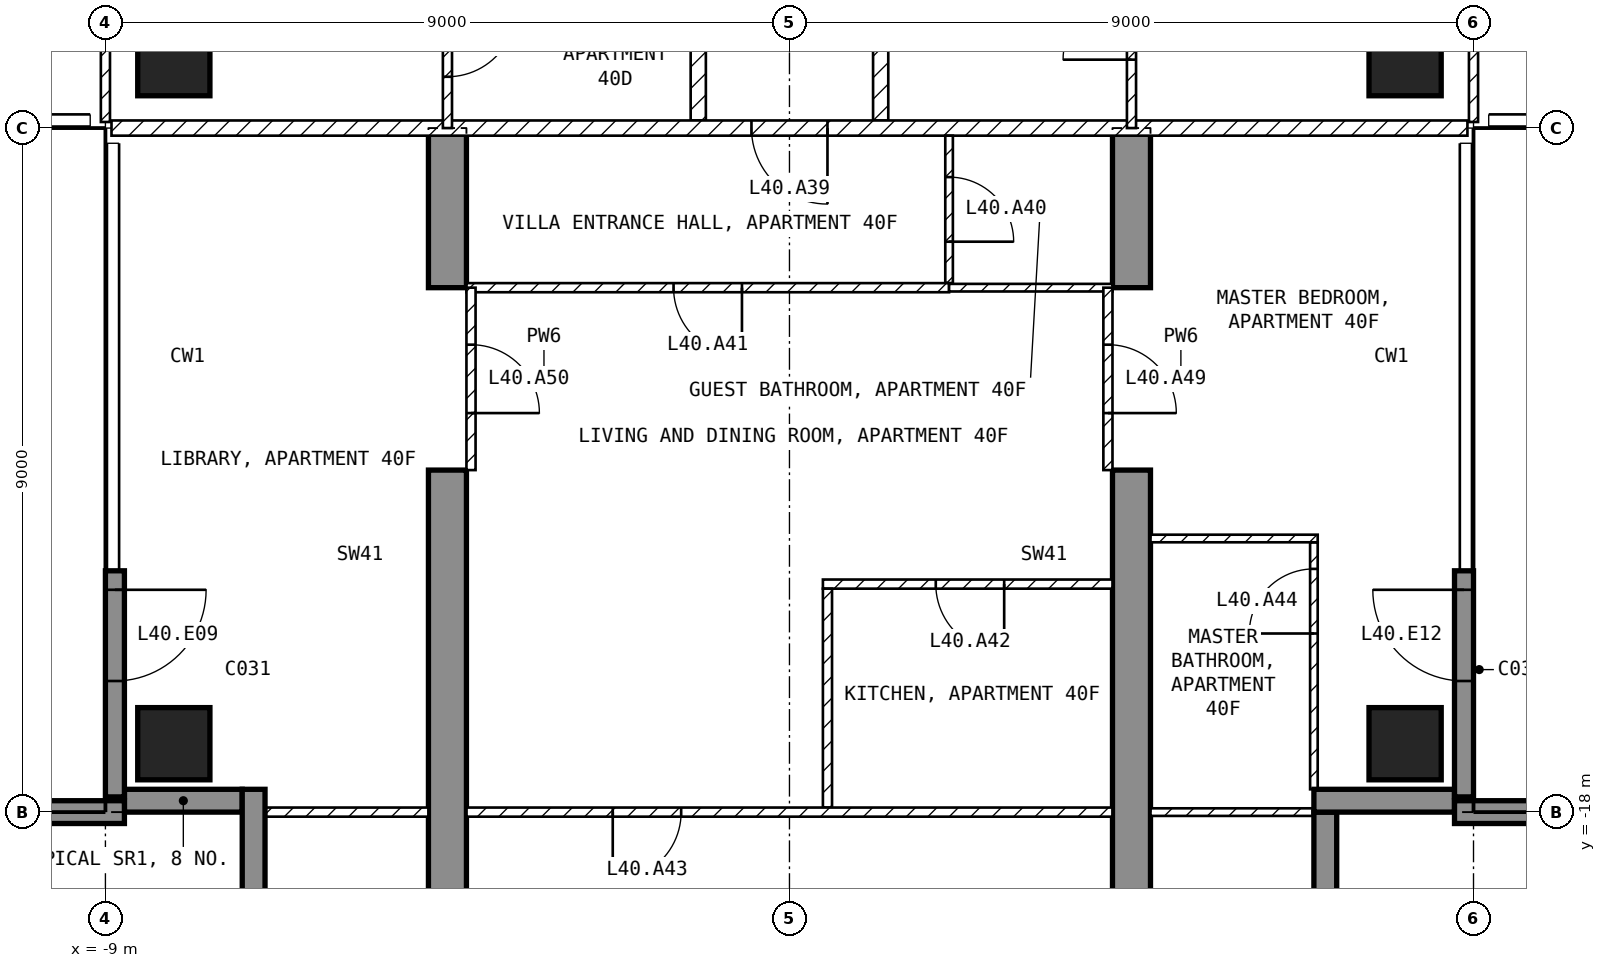
"""IFC4 building model, lengths in metres.
Left out: names, types, materials, properties, quantities, classifications, styles, units other than length and angle.
Written with IfcOpenShell. Run it as: python <this file> out.ifc"""

import sys

from ifc_helpers import new_model, si_unit, direction, frame, frame_2d, origin, origin_2d, place, context, subcontext, project, spatial, polyline, rectangle, outline, extrude, element, fill, save


model = new_model("IFC4")
c1 = context("Model", 3, precision=1e-05, world=origin(), true_north=direction((0.0, 1.0)))
c2 = subcontext(c1, "Body", "Model", "MODEL_VIEW")
j1 = project(units=[si_unit("LENGTHUNIT", "METRE"), si_unit("PLANEANGLEUNIT", "RADIAN")], contexts=[c1])
p1 = place(None, origin())
s1 = spatial("IfcSite", under=j1, at=p1, CompositionType="ELEMENT")
p2 = place(p1, origin())
s2 = spatial("IfcBuilding", under=s1, at=p2, CompositionType="ELEMENT")
p3 = place(p2, frame((0.0, 0.0, 166.6)))
s3 = spatial("IfcBuildingStorey", under=s2, at=p3, CompositionType="ELEMENT", Elevation=166.6)
for number, where, z_axis, x_axis in (
    (1, (-8.1, -17.1, -0.25), (0.0, 0.0, 1.0), (1.0, 0.0, 0.0)),
    (2, (-8.1, -8.1, -0.25), (0.0, 0.0, 1.0), (1.0, 0.0, 0.0)),
    (3, (8.1, -17.1, -0.25), (0.0, 0.0, 1.0), (1.0, 0.0, 0.0)),
    (4, (8.1, -8.1, -0.25), (0.0, 0.0, 1.0), (1.0, 0.0, 0.0)),
):
    element("IfcColumn", number, at=place(p3, frame(where, z_axis=z_axis, x_axis=x_axis)), inside=s3, PredefinedType="COLUMN", context=c2, shape_type="SweptSolid", body=[
        extrude(rectangle(XDim=0.95, YDim=0.95, at=origin_2d()), origin(), (0.0, 0.0, 1.0), 3.5),
    ])
for number, where, z_axis, x_axis in (
    (5, (-4.75, -20.225, -0.25), (1.0, 0.0, 0.0), (0.0, 1.0, 0.0)),
    (6, (4.25, -20.225, -0.25), (1.0, 0.0, 0.0), (0.0, 1.0, 0.0)),
):
    element("IfcWall", number, at=place(p3, frame(where, z_axis=z_axis, x_axis=x_axis)), inside=s3, PredefinedType="SHEAR", context=c2, shape_type="SweptSolid", body=[
        extrude(outline(polyline([(0.0, 0.0), (6.725, 0.0), (6.725, 2.65), (9.125, 2.65), (9.125, 0.0), (11.225, 0.0), (11.225, 3.5), (0.0, 3.5), (0.0, 0.0)])), origin(), (0.0, 0.0, 1.0), 0.5),
    ])
p4 = place(p3, frame((-8.875, -14.825, 0.0), z_axis=(0.0, 0.0, 1.0), x_axis=(0.0, -1.0, 0.0)))
e7 = element("IfcWall", 7, at=p4, inside=s3, PredefinedType="SOLIDWALL", context=c2, shape_type="SweptSolid", body=[
    extrude(rectangle(XDim=2.975, YDim=0.25, at=frame_2d((1.488, 0.0))), origin(), (0.0, 0.0, 1.0), 3.25),
])
p5 = place(p4, frame((0.25, 0.0, 0.0)))
e8 = element("IfcOpeningElement", 8, at=p5, cuts=e7, PredefinedType="OPENING", context=c2, shape_type="SweptSolid", body=[
    extrude(rectangle(XDim=1.2, YDim=2.4, at=frame_2d((0.6, 1.2))), frame((0.0, 0.135, 0.0), z_axis=(0.0, -1.0, 0.0), x_axis=(1.0, 0.0, 0.0)), (0.0, 0.0, 1.0), 0.27),
])
p6 = place(p3, frame((8.875, -17.8, 0.0), z_axis=(0.0, 0.0, 1.0), x_axis=(0.0, 1.0, 0.0)))
e9 = element("IfcWall", 9, at=p6, inside=s3, PredefinedType="SOLIDWALL", context=c2, shape_type="SweptSolid", body=[
    extrude(rectangle(XDim=2.975, YDim=0.25, at=frame_2d((1.488, 0.0))), origin(), (0.0, 0.0, 1.0), 3.25),
])
p7 = place(p6, frame((1.525, 0.0, 0.0)))
e10 = element("IfcOpeningElement", 10, at=p7, cuts=e9, PredefinedType="OPENING", context=c2, shape_type="SweptSolid", body=[
    extrude(rectangle(XDim=1.2, YDim=2.4, at=frame_2d((0.6, 1.2))), frame((0.0, 0.135, 0.0), z_axis=(0.0, -1.0, 0.0), x_axis=(1.0, 0.0, 0.0)), (0.0, 0.0, 1.0), 0.27),
])
p8 = place(p3, frame((7.05, -19.8, 0.0), z_axis=(0.0, 0.0, 1.0), x_axis=(0.0, 1.0, 0.0)))
e11 = element("IfcWall", 11, at=p8, inside=s3, PredefinedType="SOLIDWALL", context=c2, shape_type="SweptSolid", body=[
    extrude(rectangle(XDim=1.8, YDim=0.3, at=frame_2d((0.9, 0.0))), origin(), (0.0, 0.0, 1.0), 3.25),
])
p9 = place(p3, frame((6.9, -17.85, 0.0), z_axis=(0.0, 0.0, 1.0), x_axis=(1.0, 0.0, 0.0)))
e12 = element("IfcWall", 12, at=p9, inside=s3, PredefinedType="SOLIDWALL", context=c2, shape_type="SweptSolid", body=[
    extrude(rectangle(XDim=1.85, YDim=0.3, at=frame_2d((0.925, 0.0))), origin(), (0.0, 0.0, 1.0), 3.25),
])
p10 = place(p3, frame((-8.75, -17.85, 0.0), z_axis=(0.0, 0.0, 1.0), x_axis=(1.0, 0.0, 0.0)))
e13 = element("IfcWall", 13, at=p10, inside=s3, PredefinedType="SOLIDWALL", context=c2, shape_type="SweptSolid", body=[
    extrude(rectangle(XDim=1.55, YDim=0.3, at=frame_2d((0.775, 0.0))), origin(), (0.0, 0.0, 1.0), 3.25),
])
p11 = place(p3, frame((-7.05, -17.7, 0.0), z_axis=(0.0, 0.0, 1.0), x_axis=(0.0, -1.0, 0.0)))
e14 = element("IfcWall", 14, at=p11, inside=s3, PredefinedType="SOLIDWALL", context=c2, shape_type="SweptSolid", body=[
    extrude(rectangle(XDim=1.8, YDim=0.3, at=frame_2d((0.9, 0.0))), origin(), (0.0, 0.0, 1.0), 3.25),
])
for number, where, z_axis, x_axis in (
    (15, (-8.75, -18.0, 0.0), (0.0, 0.0, 1.0), (-1.0, 0.0, 0.0)),
    (16, (8.75, -18.0, 0.0), (0.0, 0.0, 1.0), (1.0, 0.0, 0.0)),
):
    element("IfcWall", number, at=place(p3, frame(where, z_axis=z_axis, x_axis=x_axis)), inside=s3, PredefinedType="SOLIDWALL", context=c2, shape_type="SweptSolid", body=[
        extrude(rectangle(XDim=2.95, YDim=0.3, at=frame_2d((1.475, 0.0))), origin(), (0.0, 0.0, 1.0), 3.25),
    ])
for number, where, z_axis, x_axis in (
    (17, (1.2, -4.6, 0.0), (0.0, 0.0, 1.0), (0.0, -1.0, 0.0)),
    (18, (-1.2, -8.9, 0.0), (0.0, 0.0, 1.0), (0.0, 1.0, 0.0)),
):
    element("IfcWall", number, at=place(p3, frame(where, z_axis=z_axis, x_axis=x_axis)), inside=s3, PredefinedType="PARTITIONING", context=c2, shape_type="SweptSolid", body=[
        extrude(rectangle(XDim=4.3, YDim=0.2, at=frame_2d((2.15, 0.0))), origin(), (0.0, 0.0, 1.0), 3.25),
    ])
p12 = place(p3, frame((8.92, -9.0, 0.0), z_axis=(0.0, 0.0, 1.0), x_axis=(-1.0, 0.0, 0.0)))
e19 = element("IfcWall", 19, at=p12, inside=s3, PredefinedType="PARTITIONING", context=c2, shape_type="SweptSolid", body=[
    extrude(rectangle(XDim=17.84, YDim=0.2, at=frame_2d((8.92, 0.0))), origin(), (0.0, 0.0, 1.0), 3.25),
])
p13 = place(p12, frame((8.42, 0.0, 0.0)))
e20 = element("IfcOpeningElement", 20, at=p13, cuts=e19, PredefinedType="OPENING", context=c2, shape_type="SweptSolid", body=[
    extrude(rectangle(XDim=1.0, YDim=2.1, at=frame_2d((0.5, 1.05))), frame((0.0, 0.11, 0.0), z_axis=(0.0, -1.0, 0.0), x_axis=(1.0, 0.0, 0.0)), (0.0, 0.0, 1.0), 0.22),
])
p14 = place(p3, frame((9.0, -8.92, 0.0), z_axis=(0.0, 0.0, 1.0), x_axis=(0.0, 1.0, 0.0)))
e21 = element("IfcWall", 21, at=p14, inside=s3, PredefinedType="PARTITIONING", context=c2, shape_type="SweptSolid", body=[
    extrude(rectangle(XDim=7.62, YDim=0.12, at=frame_2d((3.81, 0.0))), origin(), (0.0, 0.0, 1.0), 3.25),
])
p15 = place(p14, frame((2.42, 0.0, 0.0)))
e22 = element("IfcOpeningElement", 22, at=p15, cuts=e21, PredefinedType="OPENING", context=c2, shape_type="SweptSolid", body=[
    extrude(rectangle(XDim=0.9, YDim=2.1, at=frame_2d((0.45, 1.05))), frame((0.0, 0.07, 0.0), z_axis=(0.0, -1.0, 0.0), x_axis=(1.0, 0.0, 0.0)), (0.0, 0.0, 1.0), 0.14),
])
p16 = place(p3, frame((4.5, -9.0, 0.0), z_axis=(0.0, 0.0, 1.0), x_axis=(0.0, 1.0, 0.0)))
e23 = element("IfcWall", 23, at=p16, inside=s3, PredefinedType="PARTITIONING", context=c2, shape_type="SweptSolid", body=[
    extrude(rectangle(XDim=2.7, YDim=0.12, at=frame_2d((1.35, 0.0))), origin(), (0.0, 0.0, 1.0), 3.25),
])
p17 = place(p16, frame((0.9, 0.0, 0.0)))
e24 = element("IfcOpeningElement", 24, at=p17, cuts=e23, PredefinedType="OPENING", context=c2, shape_type="SweptSolid", body=[
    extrude(rectangle(XDim=0.9, YDim=2.1, at=frame_2d((0.45, 1.05))), frame((0.0, 0.07, 0.0), z_axis=(0.0, -1.0, 0.0), x_axis=(1.0, 0.0, 0.0)), (0.0, 0.0, 1.0), 0.14),
])
p18 = place(p3, frame((-9.0, -1.3, 0.0), z_axis=(0.0, 0.0, 1.0), x_axis=(0.0, -1.0, 0.0)))
e25 = element("IfcWall", 25, at=p18, inside=s3, PredefinedType="PARTITIONING", context=c2, shape_type="SweptSolid", body=[
    extrude(rectangle(XDim=7.62, YDim=0.12, at=frame_2d((3.81, 0.0))), origin(), (0.0, 0.0, 1.0), 3.25),
])
p19 = place(p18, frame((4.3, 0.0, 0.0)))
e26 = element("IfcOpeningElement", 26, at=p19, cuts=e25, PredefinedType="OPENING", context=c2, shape_type="SweptSolid", body=[
    extrude(rectangle(XDim=0.9, YDim=2.1, at=frame_2d((0.45, 1.05))), frame((0.0, 0.07, 0.0), z_axis=(0.0, -1.0, 0.0), x_axis=(1.0, 0.0, 0.0)), (0.0, 0.0, 1.0), 0.14),
])
p20 = place(p3, frame((-4.5, -6.75, 0.0), z_axis=(0.0, 0.0, 1.0), x_axis=(0.0, -1.0, 0.0)))
e27 = element("IfcWall", 27, at=p20, inside=s3, PredefinedType="PARTITIONING", context=c2, shape_type="SweptSolid", body=[
    extrude(rectangle(XDim=2.25, YDim=0.12, at=frame_2d((1.125, 0.0))), origin(), (0.0, 0.0, 1.0), 3.25),
])
p21 = place(p20, frame((0.675, 0.0, 0.0)))
e28 = element("IfcOpeningElement", 28, at=p21, cuts=e27, PredefinedType="OPENING", context=c2, shape_type="SweptSolid", body=[
    extrude(rectangle(XDim=0.9, YDim=2.1, at=frame_2d((0.45, 1.05))), frame((0.0, 0.07, 0.0), z_axis=(0.0, -1.0, 0.0), x_axis=(1.0, 0.0, 0.0)), (0.0, 0.0, 1.0), 0.14),
])
p22 = place(p3, frame((2.1, -9.1, 0.0), z_axis=(0.0, 0.0, 1.0), x_axis=(0.0, -1.0, 0.0)))
e29 = element("IfcWall", 29, at=p22, inside=s3, PredefinedType="PARTITIONING", context=c2, shape_type="SweptSolid", body=[
    extrude(rectangle(XDim=1.94, YDim=0.1, at=frame_2d((0.97, 0.0))), origin(), (0.0, 0.0, 1.0), 3.25),
])
p23 = place(p22, frame((0.545, 0.0, 0.0)))
e30 = element("IfcOpeningElement", 30, at=p23, cuts=e29, PredefinedType="OPENING", context=c2, shape_type="SweptSolid", body=[
    extrude(rectangle(XDim=0.85, YDim=2.1, at=frame_2d((0.425, 1.05))), frame((0.0, 0.06, 0.0), z_axis=(0.0, -1.0, 0.0), x_axis=(1.0, 0.0, 0.0)), (0.0, 0.0, 1.0), 0.12),
])
p24 = place(p3, frame((2.1, -11.1, 0.0), z_axis=(0.0, 0.0, 1.0), x_axis=(-1.0, 0.0, 0.0)))
e31 = element("IfcWall", 31, at=p24, inside=s3, PredefinedType="PARTITIONING", context=c2, shape_type="SweptSolid", body=[
    extrude(rectangle(XDim=6.35, YDim=0.12, at=frame_2d((3.175, 0.0))), origin(), (0.0, 0.0, 1.0), 3.25),
])
p25 = place(p24, frame((2.725, 0.0, 0.0)))
e32 = element("IfcOpeningElement", 32, at=p25, cuts=e31, PredefinedType="OPENING", context=c2, shape_type="SweptSolid", body=[
    extrude(rectangle(XDim=0.9, YDim=2.1, at=frame_2d((0.45, 1.05))), frame((0.0, 0.07, 0.0), z_axis=(0.0, -1.0, 0.0), x_axis=(1.0, 0.0, 0.0)), (0.0, 0.0, 1.0), 0.14),
])
p26 = place(p3, frame((4.25, -11.1, 0.0), z_axis=(0.0, 0.0, 1.0), x_axis=(-1.0, 0.0, 0.0)))
e33 = element("IfcWall", 33, at=p26, inside=s3, PredefinedType="PARTITIONING", context=c2, shape_type="SweptSolid", body=[
    extrude(rectangle(XDim=2.15, YDim=0.1, at=frame_2d((1.075, 0.0))), origin(), (0.0, 0.0, 1.0), 3.25),
])
p27 = place(p3, frame((4.25, -15.0, 0.0), z_axis=(0.0, 0.0, 1.0), x_axis=(-1.0, 0.0, 0.0)))
e34 = element("IfcWall", 34, at=p27, inside=s3, PredefinedType="PARTITIONING", context=c2, shape_type="SweptSolid", body=[
    extrude(rectangle(XDim=3.81, YDim=0.12, at=frame_2d((1.905, 0.0))), origin(), (0.0, 0.0, 1.0), 3.25),
])
p28 = place(p27, frame((1.425, 0.0, 0.0)))
e35 = element("IfcOpeningElement", 35, at=p28, cuts=e34, PredefinedType="OPENING", context=c2, shape_type="SweptSolid", body=[
    extrude(rectangle(XDim=0.9, YDim=2.1, at=frame_2d((0.45, 1.05))), frame((0.0, 0.07, 0.0), z_axis=(0.0, -1.0, 0.0), x_axis=(1.0, 0.0, 0.0)), (0.0, 0.0, 1.0), 0.14),
])
p29 = place(p3, frame((0.5, -15.06, 0.0), z_axis=(0.0, 0.0, 1.0), x_axis=(0.0, -1.0, 0.0)))
e36 = element("IfcWall", 36, at=p29, inside=s3, PredefinedType="PARTITIONING", context=c2, shape_type="SweptSolid", body=[
    extrude(rectangle(XDim=2.88, YDim=0.12, at=frame_2d((1.44, 0.0))), origin(), (0.0, 0.0, 1.0), 3.25),
])
p30 = place(p3, frame((4.25, -18.0, 0.0), z_axis=(0.0, 0.0, 1.0), x_axis=(-1.0, 0.0, 0.0)))
e37 = element("IfcWall", 37, at=p30, inside=s3, PredefinedType="PARTITIONING", context=c2, shape_type="SweptSolid", body=[
    extrude(rectangle(XDim=8.5, YDim=0.12, at=frame_2d((4.25, 0.0))), origin(), (0.0, 0.0, 1.0), 3.25),
])
p31 = place(p30, frame((5.675, 0.0, 0.0)))
e38 = element("IfcOpeningElement", 38, at=p31, cuts=e37, PredefinedType="OPENING", context=c2, shape_type="SweptSolid", body=[
    extrude(rectangle(XDim=0.9, YDim=2.1, at=frame_2d((0.45, 1.05))), frame((0.0, 0.07, 0.0), z_axis=(0.0, -1.0, 0.0), x_axis=(1.0, 0.0, 0.0)), (0.0, 0.0, 1.0), 0.14),
])
p32 = place(p3, frame((6.9, -17.7, 0.0), z_axis=(0.0, 0.0, 1.0), x_axis=(0.0, 1.0, 0.0)))
e39 = element("IfcWall", 39, at=p32, inside=s3, PredefinedType="PARTITIONING", context=c2, shape_type="SweptSolid", body=[
    extrude(rectangle(XDim=3.25, YDim=0.1, at=frame_2d((1.625, 0.0))), origin(), (0.0, 0.0, 1.0), 3.25),
])
p33 = place(p32, frame((2.05, 0.0, 0.0)))
e40 = element("IfcOpeningElement", 40, at=p33, cuts=e39, PredefinedType="OPENING", context=c2, shape_type="SweptSolid", body=[
    extrude(rectangle(XDim=0.85, YDim=2.1, at=frame_2d((0.425, 1.05))), frame((0.0, 0.06, 0.0), z_axis=(0.0, -1.0, 0.0), x_axis=(1.0, 0.0, 0.0)), (0.0, 0.0, 1.0), 0.12),
])
p34 = place(p3, frame((6.95, -14.4, 0.0), z_axis=(0.0, 0.0, 1.0), x_axis=(-1.0, 0.0, 0.0)))
e41 = element("IfcWall", 41, at=p34, inside=s3, PredefinedType="PARTITIONING", context=c2, shape_type="SweptSolid", body=[
    extrude(rectangle(XDim=2.2, YDim=0.1, at=frame_2d((1.1, 0.0))), origin(), (0.0, 0.0, 1.0), 3.25),
])
p35 = place(p3, frame((7.12, -18.0, 0.0), z_axis=(0.0, 0.0, 1.0), x_axis=(-1.0, 0.0, 0.0)))
e42 = element("IfcWall", 42, at=p35, inside=s3, PredefinedType="PARTITIONING", context=c2, shape_type="SweptSolid", body=[
    extrude(rectangle(XDim=2.37, YDim=0.1, at=frame_2d((1.185, 0.0))), origin(), (0.0, 0.0, 1.0), 3.25),
])
p36 = place(p3, frame((-4.75, -18.0, 0.0), z_axis=(0.0, 0.0, 1.0), x_axis=(-1.0, 0.0, 0.0)))
e43 = element("IfcWall", 43, at=p36, inside=s3, PredefinedType="PARTITIONING", context=c2, shape_type="SweptSolid", body=[
    extrude(rectangle(XDim=2.37, YDim=0.12, at=frame_2d((1.185, 0.0))), origin(), (0.0, 0.0, 1.0), 3.25),
])
p37 = place(p3, frame((4.19, -11.1, 0.0), z_axis=(0.0, 0.0, 1.0), x_axis=(0.0, -1.0, 0.0)))
e44 = element("IfcWall", 44, at=p37, inside=s3, PredefinedType="PARTITIONING", context=c2, shape_type="SweptSolid", body=[
    extrude(rectangle(XDim=2.4, YDim=0.12, at=frame_2d((1.2, 0.0))), origin(), (0.0, 0.0, 1.0), 2.4),
])
p38 = place(p37, frame((0.75, 0.0, 0.0)))
e45 = element("IfcOpeningElement", 45, at=p38, cuts=e44, PredefinedType="OPENING", context=c2, shape_type="SweptSolid", body=[
    extrude(rectangle(XDim=0.9, YDim=2.1, at=frame_2d((0.45, 1.05))), frame((0.0, 0.07, 0.0), z_axis=(0.0, -1.0, 0.0), x_axis=(1.0, 0.0, 0.0)), (0.0, 0.0, 1.0), 0.14),
])
p39 = place(p3, frame((-4.19, -11.1, 0.0), z_axis=(0.0, 0.0, 1.0), x_axis=(0.0, -1.0, 0.0)))
e46 = element("IfcWall", 46, at=p39, inside=s3, PredefinedType="PARTITIONING", context=c2, shape_type="SweptSolid", body=[
    extrude(rectangle(XDim=2.4, YDim=0.12, at=frame_2d((1.2, 0.0))), origin(), (0.0, 0.0, 1.0), 2.4),
])
p40 = place(p39, frame((0.75, 0.0, 0.0)))
e47 = element("IfcOpeningElement", 47, at=p40, cuts=e46, PredefinedType="OPENING", context=c2, shape_type="SweptSolid", body=[
    extrude(rectangle(XDim=0.9, YDim=2.1, at=frame_2d((0.45, 1.05))), frame((0.0, 0.07, 0.0), z_axis=(0.0, -1.0, 0.0), x_axis=(1.0, 0.0, 0.0)), (0.0, 0.0, 1.0), 0.14),
])
p41 = place(p5, origin())
e48 = element("IfcDoor", 48, at=p41, inside=s3, OperationType="SINGLE_SWING_LEFT", PredefinedType="DOOR", context=c2, shape_type="SweptSolid", body=[
    extrude(rectangle(XDim=1.2, YDim=2.4, at=frame_2d((0.6, 1.2))), frame((0.0, 0.025, 0.0), z_axis=(0.0, -1.0, 0.0), x_axis=(1.0, 0.0, 0.0)), (0.0, 0.0, 1.0), 0.05),
])
fill(e8, e48)
p42 = place(p7, origin())
e49 = element("IfcDoor", 49, at=p42, inside=s3, OperationType="SINGLE_SWING_RIGHT", PredefinedType="DOOR", context=c2, shape_type="SweptSolid", body=[
    extrude(rectangle(XDim=1.2, YDim=2.4, at=frame_2d((0.6, 1.2))), frame((0.0, 0.025, 0.0), z_axis=(0.0, -1.0, 0.0), x_axis=(1.0, 0.0, 0.0)), (0.0, 0.0, 1.0), 0.05),
])
fill(e10, e49)
p43 = place(p17, origin())
e50 = element("IfcDoor", 50, at=p43, inside=s3, OperationType="SINGLE_SWING_LEFT", PredefinedType="DOOR", context=c2, shape_type="SweptSolid", body=[
    extrude(rectangle(XDim=0.9, YDim=2.1, at=frame_2d((0.45, 1.05))), frame((0.0, 0.025, 0.0), z_axis=(0.0, -1.0, 0.0), x_axis=(1.0, 0.0, 0.0)), (0.0, 0.0, 1.0), 0.05),
])
fill(e24, e50)
p44 = place(p21, origin())
e51 = element("IfcDoor", 51, at=p44, inside=s3, OperationType="SINGLE_SWING_LEFT", PredefinedType="DOOR", context=c2, shape_type="SweptSolid", body=[
    extrude(rectangle(XDim=0.9, YDim=2.1, at=frame_2d((0.45, 1.05))), frame((0.0, 0.025, 0.0), z_axis=(0.0, -1.0, 0.0), x_axis=(1.0, 0.0, 0.0)), (0.0, 0.0, 1.0), 0.05),
])
fill(e28, e51)
p45 = place(p13, origin())
e52 = element("IfcDoor", 52, at=p45, inside=s3, OperationType="SINGLE_SWING_LEFT", PredefinedType="DOOR", context=c2, shape_type="SweptSolid", body=[
    extrude(rectangle(XDim=1.0, YDim=2.1, at=frame_2d((0.5, 1.05))), frame((0.0, 0.025, 0.0), z_axis=(0.0, -1.0, 0.0), x_axis=(1.0, 0.0, 0.0)), (0.0, 0.0, 1.0), 0.05),
])
fill(e20, e52)
p46 = place(p23, origin())
e53 = element("IfcDoor", 53, at=p46, inside=s3, OperationType="SINGLE_SWING_RIGHT", PredefinedType="DOOR", context=c2, shape_type="SweptSolid", body=[
    extrude(rectangle(XDim=0.85, YDim=2.1, at=frame_2d((0.425, 1.05))), frame((0.0, 0.025, 0.0), z_axis=(0.0, -1.0, 0.0), x_axis=(1.0, 0.0, 0.0)), (0.0, 0.0, 1.0), 0.05),
])
fill(e30, e53)
p47 = place(p25, origin())
e54 = element("IfcDoor", 54, at=p47, inside=s3, OperationType="SINGLE_SWING_LEFT", PredefinedType="DOOR", context=c2, shape_type="SweptSolid", body=[
    extrude(rectangle(XDim=0.9, YDim=2.1, at=frame_2d((0.45, 1.05))), frame((0.0, 0.025, 0.0), z_axis=(0.0, -1.0, 0.0), x_axis=(1.0, 0.0, 0.0)), (0.0, 0.0, 1.0), 0.05),
])
fill(e32, e54)
p48 = place(p28, origin())
e55 = element("IfcDoor", 55, at=p48, inside=s3, OperationType="SINGLE_SWING_LEFT", PredefinedType="DOOR", context=c2, shape_type="SweptSolid", body=[
    extrude(rectangle(XDim=0.9, YDim=2.1, at=frame_2d((0.45, 1.05))), frame((0.0, 0.025, 0.0), z_axis=(0.0, -1.0, 0.0), x_axis=(1.0, 0.0, 0.0)), (0.0, 0.0, 1.0), 0.05),
])
fill(e35, e55)
p49 = place(p31, origin())
e56 = element("IfcDoor", 56, at=p49, inside=s3, OperationType="SINGLE_SWING_RIGHT", PredefinedType="DOOR", context=c2, shape_type="SweptSolid", body=[
    extrude(rectangle(XDim=0.9, YDim=2.1, at=frame_2d((0.45, 1.05))), frame((0.0, 0.025, 0.0), z_axis=(0.0, -1.0, 0.0), x_axis=(1.0, 0.0, 0.0)), (0.0, 0.0, 1.0), 0.05),
])
fill(e38, e56)
p50 = place(p33, origin())
e57 = element("IfcDoor", 57, at=p50, inside=s3, OperationType="SINGLE_SWING_LEFT", PredefinedType="DOOR", context=c2, shape_type="SweptSolid", body=[
    extrude(rectangle(XDim=0.85, YDim=2.1, at=frame_2d((0.425, 1.05))), frame((0.0, 0.025, 0.0), z_axis=(0.0, -1.0, 0.0), x_axis=(1.0, 0.0, 0.0)), (0.0, 0.0, 1.0), 0.05),
])
fill(e40, e57)
p51 = place(p38, origin())
e58 = element("IfcDoor", 58, at=p51, inside=s3, OperationType="SINGLE_SWING_RIGHT", PredefinedType="DOOR", context=c2, shape_type="SweptSolid", body=[
    extrude(rectangle(XDim=0.9, YDim=2.1, at=frame_2d((0.45, 1.05))), frame((0.0, 0.025, 0.0), z_axis=(0.0, -1.0, 0.0), x_axis=(1.0, 0.0, 0.0)), (0.0, 0.0, 1.0), 0.05),
])
fill(e45, e58)
p52 = place(p40, origin())
e59 = element("IfcDoor", 59, at=p52, inside=s3, OperationType="SINGLE_SWING_RIGHT", PredefinedType="DOOR", context=c2, shape_type="SweptSolid", body=[
    extrude(rectangle(XDim=0.9, YDim=2.1, at=frame_2d((0.45, 1.05))), frame((0.0, 0.025, 0.0), z_axis=(0.0, -1.0, 0.0), x_axis=(1.0, 0.0, 0.0)), (0.0, 0.0, 1.0), 0.05),
])
fill(e47, e59)
save(model, sys.argv[1])
